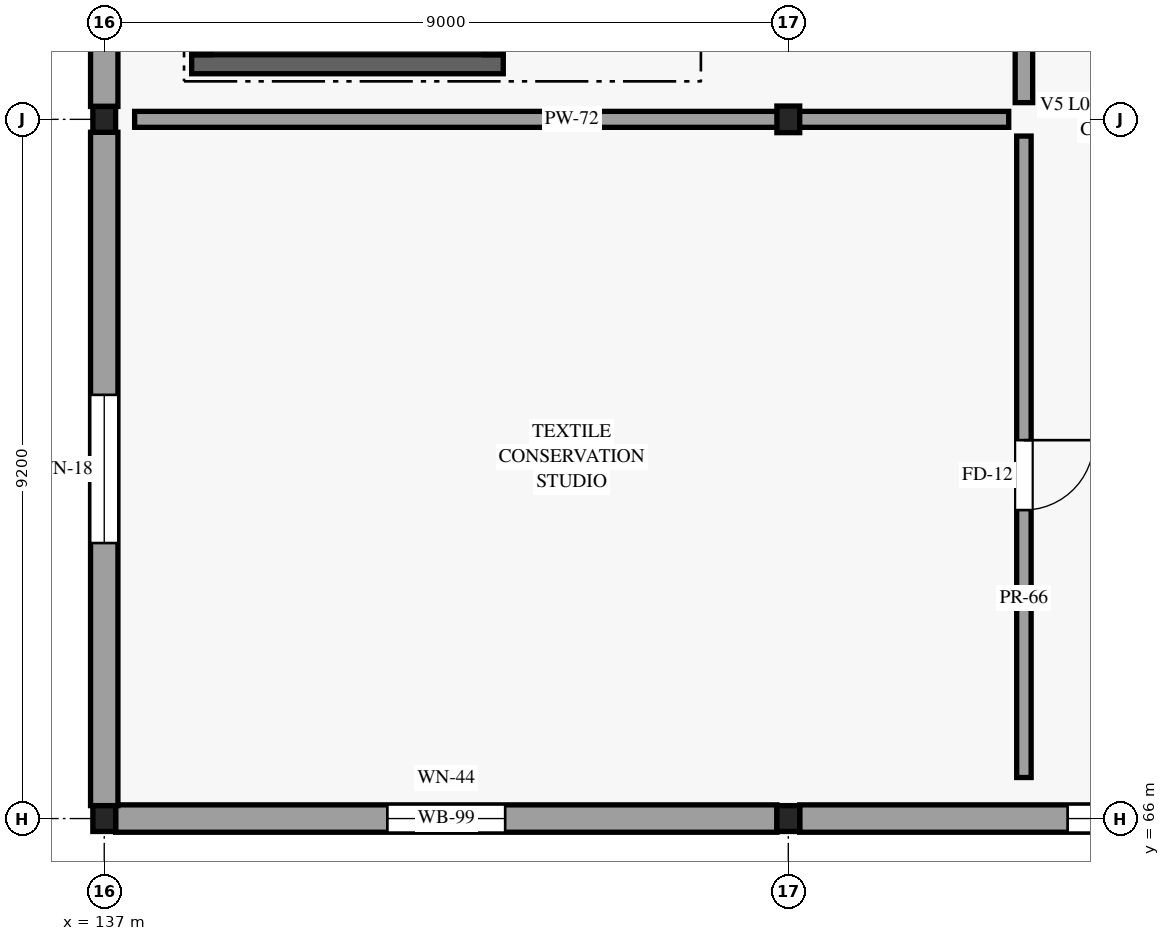
"""IFC4 building model, lengths in metres.
Left out: names, types, materials, properties, quantities, classifications, styles, units other than length and angle.
Written with IfcOpenShell. Run it as: python <this file> out.ifc"""

import sys

from ifc_helpers import new_model, si_unit, direction, frame, frame_2d, origin, origin_2d, place, context, subcontext, project, spatial, rectangle, i_section, extrude, element, fill, save


model = new_model("IFC4")
c1 = context("Model", 3, precision=1e-05, world=origin(), true_north=direction((0.0, 1.0)))
c2 = subcontext(c1, "Body", "Model", "MODEL_VIEW")
j1 = project(units=[si_unit("LENGTHUNIT", "METRE"), si_unit("PLANEANGLEUNIT", "RADIAN")], contexts=[c1])
p1 = place(None, origin())
s1 = spatial("IfcSite", under=j1, at=p1, CompositionType="ELEMENT")
p2 = place(p1, origin())
s2 = spatial("IfcBuilding", under=s1, at=p2, CompositionType="ELEMENT")
p3 = place(p2, frame((0.0, 0.0, 19.5)))
s3 = spatial("IfcBuildingStorey", under=s2, at=p3, CompositionType="ELEMENT", Elevation=19.5)
for number, where, z_axis, x_axis in (
    (1, (137.0, 66.0, 0.0), (0.0, 0.0, 1.0), (1.0, 0.0, 0.0)),
    (2, (137.0, 75.2, 0.0), (0.0, 0.0, 1.0), (1.0, 0.0, 0.0)),
    (3, (146.0, 66.0, 0.0), (0.0, 0.0, 1.0), (1.0, 0.0, 0.0)),
):
    element("IfcColumn", number, at=place(p3, frame(where, z_axis=z_axis, x_axis=x_axis)), inside=s3, PredefinedType="COLUMN", context=c2, shape_type="SweptSolid", body=[
        extrude(i_section(OverallWidth=0.3, OverallDepth=0.34, WebThickness=0.012, FlangeThickness=0.021, FilletRadius=0.027, at=origin_2d()), origin(), (0.0, 0.0, 1.0), 4.5),
    ])
p4 = place(p3, frame((146.0, 75.2, 0.0), z_axis=(0.0, 0.0, 1.0), x_axis=(1.0, 0.0, 0.0)))
e4 = element("IfcColumn", 4, at=p4, inside=s3, PredefinedType="COLUMN", context=c2, shape_type="SweptSolid", body=[
    extrude(i_section(OverallWidth=0.3, OverallDepth=0.35, WebThickness=0.01, FlangeThickness=0.018, FilletRadius=0.027, at=origin_2d()), origin(), (0.0, 0.0, 1.0), 4.5),
])
p5 = place(p3, frame((137.15, 66.0, 0.0), z_axis=(0.0, 0.0, 1.0), x_axis=(1.0, 0.0, 0.0)))
e5 = element("IfcWall", 5, at=p5, inside=s3, PredefinedType="STANDARD", context=c2, shape_type="SweptSolid", body=[
    extrude(rectangle(XDim=8.7, YDim=0.36, at=frame_2d((4.35, 0.0))), origin(), (0.0, 0.0, 1.0), 3.825),
])
p6 = place(p5, frame((5.125, 0.0, 0.85), z_axis=(0.0, 0.0, 1.0), x_axis=(-1.0, 0.0, 0.0)))
e6 = element("IfcOpeningElement", 6, at=p6, cuts=e5, PredefinedType="OPENING", context=c2, shape_type="SweptSolid", body=[
    extrude(rectangle(XDim=1.55, YDim=1.95, at=frame_2d((0.775, 0.975))), frame((0.0, 0.19, 0.0), z_axis=(0.0, -1.0, 0.0), x_axis=(1.0, 0.0, 0.0)), (0.0, 0.0, 1.0), 0.38),
])
p7 = place(p3, frame((146.15, 66.0, 0.0), z_axis=(0.0, 0.0, 1.0), x_axis=(1.0, 0.0, 0.0)))
e7 = element("IfcWall", 7, at=p7, inside=s3, PredefinedType="STANDARD", context=c2, shape_type="SweptSolid", body=[
    extrude(rectangle(XDim=8.7, YDim=0.36, at=frame_2d((4.35, 0.0))), origin(), (0.0, 0.0, 1.0), 3.825),
])
p8 = place(p7, frame((5.175, 0.0, 0.85), z_axis=(0.0, 0.0, 1.0), x_axis=(-1.0, 0.0, 0.0)))
e8 = element("IfcOpeningElement", 8, at=p8, cuts=e7, PredefinedType="OPENING", context=c2, shape_type="SweptSolid", body=[
    extrude(rectangle(XDim=1.65, YDim=2.0, at=frame_2d((0.825, 1.0))), frame((0.0, 0.19, 0.0), z_axis=(0.0, -1.0, 0.0), x_axis=(1.0, 0.0, 0.0)), (0.0, 0.0, 1.0), 0.38),
])
p9 = place(p3, frame((137.0, 66.17, 0.0), z_axis=(0.0, 0.0, 1.0), x_axis=(0.0, 1.0, 0.0)))
e9 = element("IfcWall", 9, at=p9, inside=s3, PredefinedType="STANDARD", context=c2, shape_type="SweptSolid", body=[
    extrude(rectangle(XDim=8.86, YDim=0.36, at=frame_2d((4.43, 0.0))), origin(), (0.0, 0.0, 1.0), 3.825),
])
p10 = place(p9, frame((3.455, 0.0, 0.85)))
e10 = element("IfcOpeningElement", 10, at=p10, cuts=e9, PredefinedType="OPENING", context=c2, shape_type="SweptSolid", body=[
    extrude(rectangle(XDim=1.95, YDim=2.15, at=frame_2d((0.975, 1.075))), frame((0.0, 0.19, 0.0), z_axis=(0.0, -1.0, 0.0), x_axis=(1.0, 0.0, 0.0)), (0.0, 0.0, 1.0), 0.38),
])
p11 = place(p3, frame((137.0, 75.37, 0.0), z_axis=(0.0, 0.0, 1.0), x_axis=(0.0, 1.0, 0.0)))
e11 = element("IfcWall", 11, at=p11, inside=s3, PredefinedType="STANDARD", context=c2, shape_type="SweptSolid", body=[
    extrude(rectangle(XDim=8.86, YDim=0.36, at=frame_2d((4.43, 0.0))), origin(), (0.0, 0.0, 1.0), 3.825),
])
p12 = place(p11, frame((3.355, 0.0, 0.85)))
e12 = element("IfcOpeningElement", 12, at=p12, cuts=e11, PredefinedType="OPENING", context=c2, shape_type="SweptSolid", body=[
    extrude(rectangle(XDim=2.15, YDim=2.25, at=frame_2d((1.075, 1.125))), frame((0.0, 0.19, 0.0), z_axis=(0.0, -1.0, 0.0), x_axis=(1.0, 0.0, 0.0)), (0.0, 0.0, 1.0), 0.38),
])
p13 = place(p3, frame((138.15, 75.925, 0.0), z_axis=(0.0, 0.0, 1.0), x_axis=(1.0, 0.0, 0.0)))
e13 = element("IfcWall", 13, at=p13, inside=s3, PredefinedType="SHEAR", context=c2, shape_type="SweptSolid", body=[
    extrude(rectangle(XDim=4.1, YDim=0.25, at=frame_2d((2.05, 0.0))), origin(), (0.0, 0.0, 1.0), 4.22),
])
for number, where, z_axis, x_axis in (
    (14, (138.275, 76.05, 0.0), (0.0, 0.0, 1.0), (0.0, 1.0, 0.0)),
    (15, (142.125, 76.05, 0.0), (0.0, 0.0, 1.0), (0.0, 1.0, 0.0)),
):
    element("IfcWall", number, at=place(p3, frame(where, z_axis=z_axis, x_axis=x_axis)), inside=s3, PredefinedType="SHEAR", context=c2, shape_type="SweptSolid", body=[
        extrude(rectangle(XDim=8.65, YDim=0.25, at=frame_2d((4.325, 0.0))), origin(), (0.0, 0.0, 1.0), 4.22),
    ])
p14 = place(p3, frame((149.1, 66.54, 0.0), z_axis=(0.0, 0.0, 1.0), x_axis=(0.0, 1.0, 0.0)))
e16 = element("IfcWall", 16, at=p14, inside=s3, PredefinedType="PARTITIONING", context=c2, shape_type="SweptSolid", body=[
    extrude(rectangle(XDim=8.44, YDim=0.19, at=frame_2d((4.22, 0.0))), origin(), (0.0, 0.0, 1.0), 3.825),
])
p15 = place(p14, frame((4.439, 0.0, 0.0), z_axis=(0.0, 0.0, 1.0), x_axis=(-1.0, 0.0, 0.0)))
e17 = element("IfcOpeningElement", 17, at=p15, cuts=e16, PredefinedType="OPENING", context=c2, shape_type="SweptSolid", body=[
    extrude(rectangle(XDim=0.92, YDim=2.12, at=frame_2d((0.46, 1.06))), frame((0.0, 0.105, 0.0), z_axis=(0.0, -1.0, 0.0), x_axis=(1.0, 0.0, 0.0)), (0.0, 0.0, 1.0), 0.21),
])
p16 = place(p3, frame((137.4, 75.2, 0.0), z_axis=(0.0, 0.0, 1.0), x_axis=(1.0, 0.0, 0.0)))
e18 = element("IfcWall", 18, at=p16, inside=s3, PredefinedType="PARTITIONING", context=c2, shape_type="SweptSolid", body=[
    extrude(rectangle(XDim=11.5, YDim=0.21, at=frame_2d((5.75, 0.0))), origin(), (0.0, 0.0, 1.0), 3.825),
])
p17 = place(p3, frame((149.1, 75.42, 0.0), z_axis=(0.0, 0.0, 1.0), x_axis=(0.0, 1.0, 0.0)))
e19 = element("IfcWall", 19, at=p17, inside=s3, PredefinedType="PARTITIONING", context=c2, shape_type="SweptSolid", body=[
    extrude(rectangle(XDim=8.76, YDim=0.23, at=frame_2d((4.38, 0.0))), origin(), (0.0, 0.0, 1.0), 3.825),
])
p18 = place(p17, frame((4.86, 0.0, 0.0), z_axis=(0.0, 0.0, 1.0), x_axis=(-1.0, 0.0, 0.0)))
e20 = element("IfcOpeningElement", 20, at=p18, cuts=e19, PredefinedType="OPENING", context=c2, shape_type="SweptSolid", body=[
    extrude(rectangle(XDim=0.98, YDim=2.18, at=frame_2d((0.49, 1.09))), frame((0.0, 0.125, 0.0), z_axis=(0.0, -1.0, 0.0), x_axis=(1.0, 0.0, 0.0)), (0.0, 0.0, 1.0), 0.25),
])
p19 = place(p6, origin())
e21 = element("IfcWindow", 21, at=p19, inside=s3, PartitioningType="SINGLE_PANEL", PredefinedType="WINDOW", context=c2, shape_type="SweptSolid", body=[
    extrude(rectangle(XDim=1.55, YDim=1.95, at=frame_2d((0.775, 0.975))), frame((0.0, 0.03, 0.0), z_axis=(0.0, -1.0, 0.0), x_axis=(1.0, 0.0, 0.0)), (0.0, 0.0, 1.0), 0.06),
])
fill(e6, e21)
p20 = place(p8, origin())
e22 = element("IfcWindow", 22, at=p20, inside=s3, PartitioningType="SINGLE_PANEL", PredefinedType="WINDOW", context=c2, shape_type="SweptSolid", body=[
    extrude(rectangle(XDim=1.65, YDim=2.0, at=frame_2d((0.825, 1.0))), frame((0.0, 0.03, 0.0), z_axis=(0.0, -1.0, 0.0), x_axis=(1.0, 0.0, 0.0)), (0.0, 0.0, 1.0), 0.06),
])
fill(e8, e22)
p21 = place(p10, origin())
e23 = element("IfcWindow", 23, at=p21, inside=s3, PartitioningType="SINGLE_PANEL", PredefinedType="WINDOW", context=c2, shape_type="SweptSolid", body=[
    extrude(rectangle(XDim=1.95, YDim=2.15, at=frame_2d((0.975, 1.075))), frame((0.0, 0.03, 0.0), z_axis=(0.0, -1.0, 0.0), x_axis=(1.0, 0.0, 0.0)), (0.0, 0.0, 1.0), 0.06),
])
fill(e10, e23)
p22 = place(p15, origin())
e24 = element("IfcDoor", 24, at=p22, inside=s3, OperationType="SINGLE_SWING_LEFT", PredefinedType="DOOR", context=c2, shape_type="SweptSolid", body=[
    extrude(rectangle(XDim=0.92, YDim=2.12, at=frame_2d((0.46, 1.06))), frame((0.0, 0.025, 0.0), z_axis=(0.0, -1.0, 0.0), x_axis=(1.0, 0.0, 0.0)), (0.0, 0.0, 1.0), 0.05),
])
fill(e17, e24)
save(model, sys.argv[1])
